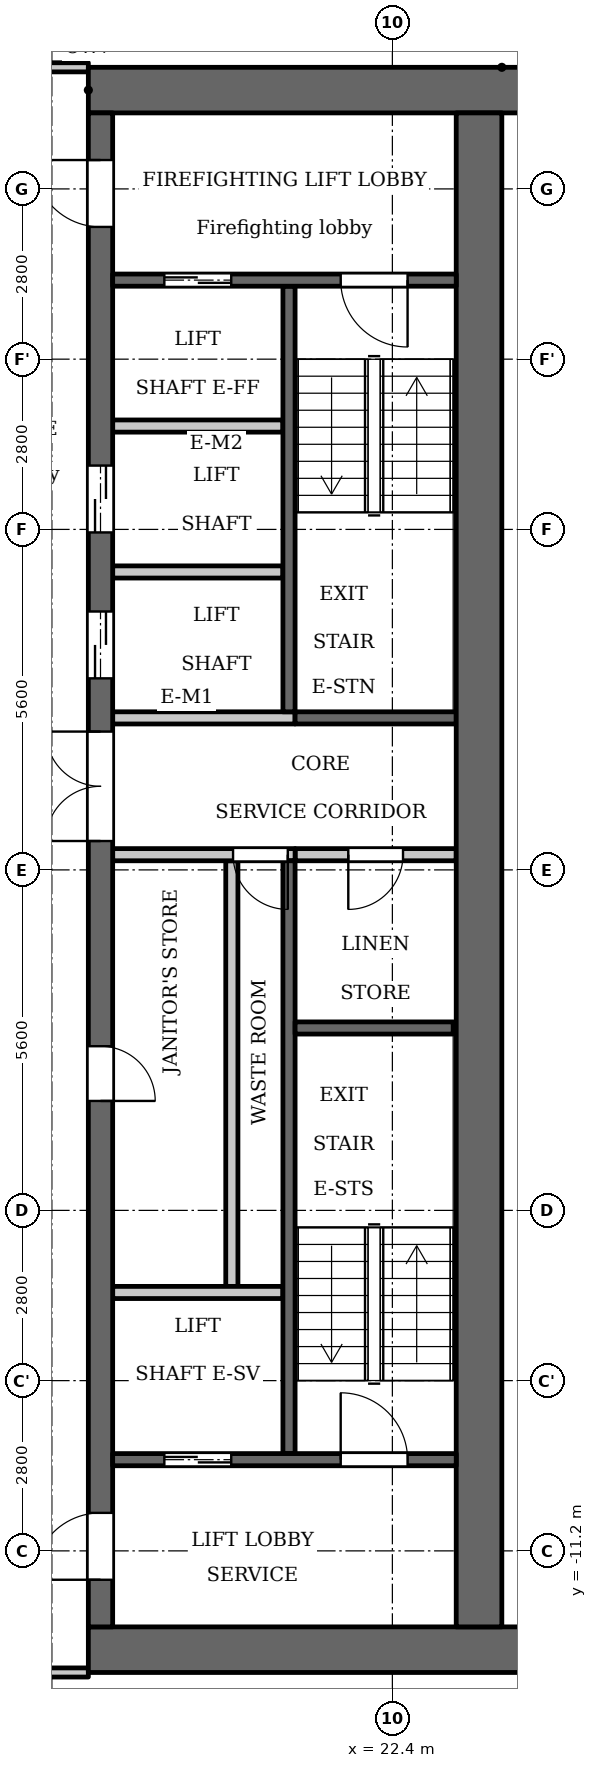
"""IFC4 building model, lengths in metres.
Left out: names, types, materials, properties, quantities, classifications, styles, units other than length and angle.
Written with IfcOpenShell. Run it as: python <this file> out.ifc"""

import sys

from ifc_helpers import new_model, si_unit, direction, frame, frame_2d, origin, place, context, subcontext, project, spatial, rectangle, extrude, element, fill, save


model = new_model("IFC4")
c1 = context("Model", 3, precision=1e-05, world=origin(), true_north=direction((0.0, 1.0)))
c2 = subcontext(c1, "Body", "Model", "MODEL_VIEW")
j1 = project(units=[si_unit("LENGTHUNIT", "METRE"), si_unit("PLANEANGLEUNIT", "RADIAN")], contexts=[c1])
p1 = place(None, origin())
s1 = spatial("IfcSite", under=j1, at=p1, CompositionType="ELEMENT")
p2 = place(p1, origin())
s2 = spatial("IfcBuilding", under=s1, at=p2, CompositionType="ELEMENT")
p3 = place(p2, frame((0.0, 0.0, 209.9)))
s3 = spatial("IfcBuildingStorey", under=s2, at=p3, CompositionType="ELEMENT", Elevation=209.9)
p4 = place(p3, frame((20.7, 2.6, 0.0), z_axis=(0.0, 0.0, 1.0), x_axis=(0.0, 1.0, 0.0)))
e1 = element("IfcWall", 1, at=p4, inside=s3, PredefinedType="SHEAR", context=c2, shape_type="SweptSolid", body=[
    extrude(rectangle(XDim=7.0, YDim=0.2, at=frame_2d((3.5, 0.0))), origin(), (0.0, 0.0, 1.0), 3.2),
])
p5 = place(p3, frame((20.7, -9.6, 0.0), z_axis=(0.0, 0.0, 1.0), x_axis=(0.0, 1.0, 0.0)))
e2 = element("IfcWall", 2, at=p5, inside=s3, PredefinedType="SHEAR", context=c2, shape_type="SweptSolid", body=[
    extrude(rectangle(XDim=9.75, YDim=0.2, at=frame_2d((4.875, 0.0))), origin(), (0.0, 0.0, 1.0), 3.2),
])
p6 = place(p3, frame((20.8, 2.5, 0.0), z_axis=(0.0, 0.0, 1.0), x_axis=(1.0, 0.0, 0.0)))
e3 = element("IfcWall", 3, at=p6, inside=s3, PredefinedType="SHEAR", context=c2, shape_type="SweptSolid", body=[
    extrude(rectangle(XDim=2.65, YDim=0.2, at=frame_2d((1.325, 0.0))), origin(), (0.0, 0.0, 1.0), 3.2),
])
p7 = place(p3, frame((20.8, 0.25, 0.0), z_axis=(0.0, 0.0, 1.0), x_axis=(1.0, 0.0, 0.0)))
e4 = element("IfcWall", 4, at=p7, inside=s3, PredefinedType="PARTITIONING", context=c2, shape_type="SweptSolid", body=[
    extrude(rectangle(XDim=2.65, YDim=0.2, at=frame_2d((1.325, 0.0))), origin(), (0.0, 0.0, 1.0), 3.2),
])
p8 = place(p7, frame((0.875, 0.0, 0.0)))
e5 = element("IfcOpeningElement", 5, at=p8, cuts=e4, PredefinedType="OPENING", context=c2, shape_type="SweptSolid", body=[
    extrude(rectangle(XDim=0.9, YDim=2.1, at=frame_2d((0.45, 1.05))), frame((0.0, 0.11, 0.0), z_axis=(0.0, -1.0, 0.0), x_axis=(1.0, 0.0, 0.0)), (0.0, 0.0, 1.0), 0.22),
])
for number, where, z_axis, x_axis in (
    (6, (17.4, 12.825, 0.0), (0.0, 0.0, 1.0), (1.0, 0.0, 0.0)),
    (7, (17.4, -12.825, 0.0), (0.0, 0.0, 1.0), (1.0, 0.0, 0.0)),
):
    element("IfcWall", number, at=place(p3, frame(where, z_axis=z_axis, x_axis=x_axis)), inside=s3, PredefinedType="SHEAR", context=c2, shape_type="SweptSolid", body=[
        extrude(rectangle(XDim=7.6, YDim=0.75, at=frame_2d((3.8, 0.0))), origin(), (0.0, 0.0, 1.0), 3.2),
    ])
p9 = place(p3, frame((19.76, -6.85, 0.0), z_axis=(0.0, 0.0, 1.0), x_axis=(0.0, 1.0, 0.0)))
e8 = element("IfcWall", 8, at=p9, inside=s3, PredefinedType="PARTITIONING", context=c2, shape_type="SweptSolid", body=[
    extrude(rectangle(XDim=7.0, YDim=0.2, at=frame_2d((3.5, 0.0))), origin(), (0.0, 0.0, 1.0), 3.2),
])
p10 = place(p3, frame((17.6, -12.45, 0.0), z_axis=(0.0, 0.0, 1.0), x_axis=(0.0, 1.0, 0.0)))
e9 = element("IfcWall", 9, at=p10, inside=s3, PredefinedType="SHEAR", context=c2, shape_type="SweptSolid", body=[
    extrude(rectangle(XDim=24.9, YDim=0.4, at=frame_2d((12.45, 0.0))), origin(), (0.0, 0.0, 1.0), 3.2),
])
p11 = place(p10, frame((8.65, 0.0, 0.0)))
e10 = element("IfcOpeningElement", 10, at=p11, cuts=e9, PredefinedType="OPENING", context=c2, shape_type="SweptSolid", body=[
    extrude(rectangle(XDim=0.9, YDim=2.1, at=frame_2d((0.45, 1.05))), frame((0.0, 0.21, 0.0), z_axis=(0.0, -1.0, 0.0), x_axis=(1.0, 0.0, 0.0)), (0.0, 0.0, 1.0), 0.42),
])
p12 = place(p10, frame((15.6, 0.0, 0.0)))
e11 = element("IfcOpeningElement", 11, at=p12, cuts=e9, PredefinedType="OPENING", context=c2, shape_type="SweptSolid", body=[
    extrude(rectangle(XDim=1.1, YDim=2.1, at=frame_2d((0.55, 1.05))), frame((0.0, 0.21, 0.0), z_axis=(0.0, -1.0, 0.0), x_axis=(1.0, 0.0, 0.0)), (0.0, 0.0, 1.0), 0.42),
])
p13 = place(p10, frame((18.0, 0.0, 0.0)))
e12 = element("IfcOpeningElement", 12, at=p13, cuts=e9, PredefinedType="OPENING", context=c2, shape_type="SweptSolid", body=[
    extrude(rectangle(XDim=1.1, YDim=2.1, at=frame_2d((0.55, 1.05))), frame((0.0, 0.21, 0.0), z_axis=(0.0, -1.0, 0.0), x_axis=(1.0, 0.0, 0.0)), (0.0, 0.0, 1.0), 0.42),
])
p14 = place(p10, frame((23.025, 0.0, 0.0)))
e13 = element("IfcOpeningElement", 13, at=p14, cuts=e9, PredefinedType="OPENING", context=c2, shape_type="SweptSolid", body=[
    extrude(rectangle(XDim=1.1, YDim=2.1, at=frame_2d((0.55, 1.05))), frame((0.0, 0.21, 0.0), z_axis=(0.0, -1.0, 0.0), x_axis=(1.0, 0.0, 0.0)), (0.0, 0.0, 1.0), 0.42),
])
p15 = place(p10, frame((0.775, 0.0, 0.0)))
e14 = element("IfcOpeningElement", 14, at=p15, cuts=e9, PredefinedType="OPENING", context=c2, shape_type="SweptSolid", body=[
    extrude(rectangle(XDim=1.1, YDim=2.1, at=frame_2d((0.55, 1.05))), frame((0.0, 0.21, 0.0), z_axis=(0.0, -1.0, 0.0), x_axis=(1.0, 0.0, 0.0)), (0.0, 0.0, 1.0), 0.42),
])
p16 = place(p10, frame((12.925, 0.0, 0.0)))
e15 = element("IfcOpeningElement", 15, at=p16, cuts=e9, PredefinedType="OPENING", context=c2, shape_type="SweptSolid", body=[
    extrude(rectangle(XDim=1.8, YDim=2.1, at=frame_2d((0.9, 1.05))), frame((0.0, 0.21, 0.0), z_axis=(0.0, -1.0, 0.0), x_axis=(1.0, 0.0, 0.0)), (0.0, 0.0, 1.0), 0.42),
])
p17 = place(p3, frame((23.825, -12.45, 0.0), z_axis=(0.0, 0.0, 1.0), x_axis=(0.0, 1.0, 0.0)))
e16 = element("IfcWall", 16, at=p17, inside=s3, PredefinedType="SHEAR", context=c2, shape_type="SweptSolid", body=[
    extrude(rectangle(XDim=24.9, YDim=0.75, at=frame_2d((12.45, 0.0))), origin(), (0.0, 0.0, 1.0), 3.2),
])
p18 = place(p3, frame((17.8, -9.7, 0.0), z_axis=(0.0, 0.0, 1.0), x_axis=(1.0, 0.0, 0.0)))
e17 = element("IfcWall", 17, at=p18, inside=s3, PredefinedType="SHEAR", context=c2, shape_type="SweptSolid", body=[
    extrude(rectangle(XDim=5.65, YDim=0.2, at=frame_2d((2.825, 0.0))), origin(), (0.0, 0.0, 1.0), 3.2),
])
p19 = place(p18, frame((0.85, 0.0, 0.0)))
e18 = element("IfcOpeningElement", 18, at=p19, cuts=e17, PredefinedType="OPENING", context=c2, shape_type="SweptSolid", body=[
    extrude(rectangle(XDim=1.1, YDim=2.1, at=frame_2d((0.55, 1.05))), frame((0.0, 0.11, 0.0), z_axis=(0.0, -1.0, 0.0), x_axis=(1.0, 0.0, 0.0)), (0.0, 0.0, 1.0), 0.22),
])
p20 = place(p18, frame((3.75, 0.0, 0.0)))
e19 = element("IfcOpeningElement", 19, at=p20, cuts=e17, PredefinedType="OPENING", context=c2, shape_type="SweptSolid", body=[
    extrude(rectangle(XDim=1.1, YDim=2.1, at=frame_2d((0.55, 1.05))), frame((0.0, 0.11, 0.0), z_axis=(0.0, -1.0, 0.0), x_axis=(1.0, 0.0, 0.0)), (0.0, 0.0, 1.0), 0.22),
])
p21 = place(p3, frame((17.8, -6.95, 0.0), z_axis=(0.0, 0.0, 1.0), x_axis=(1.0, 0.0, 0.0)))
e20 = element("IfcWall", 20, at=p21, inside=s3, PredefinedType="PARTITIONING", context=c2, shape_type="SweptSolid", body=[
    extrude(rectangle(XDim=2.8, YDim=0.2, at=frame_2d((1.4, 0.0))), origin(), (0.0, 0.0, 1.0), 3.2),
])
p22 = place(p3, frame((17.8, 0.25, 0.0), z_axis=(0.0, 0.0, 1.0), x_axis=(1.0, 0.0, 0.0)))
e21 = element("IfcWall", 21, at=p22, inside=s3, PredefinedType="PARTITIONING", context=c2, shape_type="SweptSolid", body=[
    extrude(rectangle(XDim=3.0, YDim=0.2, at=frame_2d((1.5, 0.0))), origin(), (0.0, 0.0, 1.0), 3.2),
])
p23 = place(p22, frame((1.98, 0.0, 0.0)))
e22 = element("IfcOpeningElement", 22, at=p23, cuts=e21, PredefinedType="OPENING", context=c2, shape_type="SweptSolid", body=[
    extrude(rectangle(XDim=0.9, YDim=2.1, at=frame_2d((0.45, 1.05))), frame((0.0, 0.11, 0.0), z_axis=(0.0, -1.0, 0.0), x_axis=(1.0, 0.0, 0.0)), (0.0, 0.0, 1.0), 0.22),
])
p24 = place(p3, frame((17.8, 2.5, 0.0), z_axis=(0.0, 0.0, 1.0), x_axis=(1.0, 0.0, 0.0)))
e23 = element("IfcWall", 23, at=p24, inside=s3, PredefinedType="PARTITIONING", context=c2, shape_type="SweptSolid", body=[
    extrude(rectangle(XDim=3.0, YDim=0.2, at=frame_2d((1.5, 0.0))), origin(), (0.0, 0.0, 1.0), 3.2),
])
for number, where, z_axis, x_axis in (
    (24, (17.8, 4.9, 0.0), (0.0, 0.0, 1.0), (1.0, 0.0, 0.0)),
    (25, (17.8, 7.3, 0.0), (0.0, 0.0, 1.0), (1.0, 0.0, 0.0)),
):
    element("IfcWall", number, at=place(p3, frame(where, z_axis=z_axis, x_axis=x_axis)), inside=s3, PredefinedType="PARTITIONING", context=c2, shape_type="SweptSolid", body=[
        extrude(rectangle(XDim=2.8, YDim=0.2, at=frame_2d((1.4, 0.0))), origin(), (0.0, 0.0, 1.0), 3.2),
    ])
p25 = place(p3, frame((17.8, 9.7, 0.0), z_axis=(0.0, 0.0, 1.0), x_axis=(1.0, 0.0, 0.0)))
e26 = element("IfcWall", 26, at=p25, inside=s3, PredefinedType="SHEAR", context=c2, shape_type="SweptSolid", body=[
    extrude(rectangle(XDim=5.65, YDim=0.2, at=frame_2d((2.825, 0.0))), origin(), (0.0, 0.0, 1.0), 3.2),
])
p26 = place(p25, frame((0.85, 0.0, 0.0)))
e27 = element("IfcOpeningElement", 27, at=p26, cuts=e26, PredefinedType="OPENING", context=c2, shape_type="SweptSolid", body=[
    extrude(rectangle(XDim=1.1, YDim=2.1, at=frame_2d((0.55, 1.05))), frame((0.0, 0.11, 0.0), z_axis=(0.0, -1.0, 0.0), x_axis=(1.0, 0.0, 0.0)), (0.0, 0.0, 1.0), 0.22),
])
p27 = place(p25, frame((3.75, 0.0, 0.0)))
e28 = element("IfcOpeningElement", 28, at=p27, cuts=e26, PredefinedType="OPENING", context=c2, shape_type="SweptSolid", body=[
    extrude(rectangle(XDim=1.1, YDim=2.1, at=frame_2d((0.55, 1.05))), frame((0.0, 0.11, 0.0), z_axis=(0.0, -1.0, 0.0), x_axis=(1.0, 0.0, 0.0)), (0.0, 0.0, 1.0), 0.22),
])
p28 = place(p3, frame((20.8, -2.6, 0.0), z_axis=(0.0, 0.0, 1.0), x_axis=(1.0, 0.0, 0.0)))
e29 = element("IfcWall", 29, at=p28, inside=s3, PredefinedType="SHEAR", context=c2, shape_type="SweptSolid", body=[
    extrude(rectangle(XDim=2.6, YDim=0.2, at=frame_2d((1.3, 0.0))), origin(), (0.0, 0.0, 1.0), 3.2),
])
p29 = place(p3, frame((-17.4, -13.2, 0.0), z_axis=(0.0, 0.0, 1.0), x_axis=(1.0, 0.0, 0.0)))
e30 = element("IfcWall", 30, at=p29, inside=s3, PredefinedType="PARTITIONING", context=c2, shape_type="SweptSolid", body=[
    extrude(rectangle(XDim=34.8, YDim=0.15, at=frame_2d((17.4, 0.0))), origin(), (0.0, 0.0, 1.0), 3.2),
])
p30 = place(p29, frame((0.65, 0.0, 0.0)))
e31 = element("IfcOpeningElement", 31, at=p30, cuts=e30, PredefinedType="OPENING", context=c2, shape_type="SweptSolid", body=[
    extrude(rectangle(XDim=1.0, YDim=2.1, at=frame_2d((0.5, 1.05))), frame((0.0, 0.085, 0.0), z_axis=(0.0, -1.0, 0.0), x_axis=(1.0, 0.0, 0.0)), (0.0, 0.0, 1.0), 0.17),
])
p31 = place(p29, frame((33.05, 0.0, 0.0)))
e32 = element("IfcOpeningElement", 32, at=p31, cuts=e30, PredefinedType="OPENING", context=c2, shape_type="SweptSolid", body=[
    extrude(rectangle(XDim=1.0, YDim=2.1, at=frame_2d((0.5, 1.05))), frame((0.0, 0.085, 0.0), z_axis=(0.0, -1.0, 0.0), x_axis=(1.0, 0.0, 0.0)), (0.0, 0.0, 1.0), 0.17),
])
p32 = place(p29, frame((4.55, 0.0, 0.0)))
e33 = element("IfcOpeningElement", 33, at=p32, cuts=e30, PredefinedType="OPENING", context=c2, shape_type="SweptSolid", body=[
    extrude(rectangle(XDim=1.0, YDim=2.1, at=frame_2d((0.5, 1.05))), frame((0.0, 0.085, 0.0), z_axis=(0.0, -1.0, 0.0), x_axis=(1.0, 0.0, 0.0)), (0.0, 0.0, 1.0), 0.17),
])
p33 = place(p29, frame((6.9, 0.0, 0.0)))
e34 = element("IfcOpeningElement", 34, at=p33, cuts=e30, PredefinedType="OPENING", context=c2, shape_type="SweptSolid", body=[
    extrude(rectangle(XDim=1.0, YDim=2.1, at=frame_2d((0.5, 1.05))), frame((0.0, 0.085, 0.0), z_axis=(0.0, -1.0, 0.0), x_axis=(1.0, 0.0, 0.0)), (0.0, 0.0, 1.0), 0.17),
])
p34 = place(p29, frame((15.75, 0.0, 0.0)))
e35 = element("IfcOpeningElement", 35, at=p34, cuts=e30, PredefinedType="OPENING", context=c2, shape_type="SweptSolid", body=[
    extrude(rectangle(XDim=1.0, YDim=2.1, at=frame_2d((0.5, 1.05))), frame((0.0, 0.085, 0.0), z_axis=(0.0, -1.0, 0.0), x_axis=(1.0, 0.0, 0.0)), (0.0, 0.0, 1.0), 0.17),
])
p35 = place(p29, frame((18.1, 0.0, 0.0)))
e36 = element("IfcOpeningElement", 36, at=p35, cuts=e30, PredefinedType="OPENING", context=c2, shape_type="SweptSolid", body=[
    extrude(rectangle(XDim=1.0, YDim=2.1, at=frame_2d((0.5, 1.05))), frame((0.0, 0.085, 0.0), z_axis=(0.0, -1.0, 0.0), x_axis=(1.0, 0.0, 0.0)), (0.0, 0.0, 1.0), 0.17),
])
p36 = place(p29, frame((26.95, 0.0, 0.0)))
e37 = element("IfcOpeningElement", 37, at=p36, cuts=e30, PredefinedType="OPENING", context=c2, shape_type="SweptSolid", body=[
    extrude(rectangle(XDim=1.0, YDim=2.1, at=frame_2d((0.5, 1.05))), frame((0.0, 0.085, 0.0), z_axis=(0.0, -1.0, 0.0), x_axis=(1.0, 0.0, 0.0)), (0.0, 0.0, 1.0), 0.17),
])
p37 = place(p29, frame((29.25, 0.0, 0.0)))
e38 = element("IfcOpeningElement", 38, at=p37, cuts=e30, PredefinedType="OPENING", context=c2, shape_type="SweptSolid", body=[
    extrude(rectangle(XDim=1.0, YDim=2.1, at=frame_2d((0.5, 1.05))), frame((0.0, 0.085, 0.0), z_axis=(0.0, -1.0, 0.0), x_axis=(1.0, 0.0, 0.0)), (0.0, 0.0, 1.0), 0.17),
])
p38 = place(p3, frame((-17.4, 13.2, 0.0), z_axis=(0.0, 0.0, 1.0), x_axis=(1.0, 0.0, 0.0)))
e39 = element("IfcWall", 39, at=p38, inside=s3, PredefinedType="PARTITIONING", context=c2, shape_type="SweptSolid", body=[
    extrude(rectangle(XDim=34.8, YDim=0.15, at=frame_2d((17.4, 0.0))), origin(), (0.0, 0.0, 1.0), 3.2),
])
p39 = place(p38, frame((0.75, 0.0, 0.0)))
e40 = element("IfcOpeningElement", 40, at=p39, cuts=e39, PredefinedType="OPENING", context=c2, shape_type="SweptSolid", body=[
    extrude(rectangle(XDim=1.0, YDim=2.1, at=frame_2d((0.5, 1.05))), frame((0.0, 0.085, 0.0), z_axis=(0.0, -1.0, 0.0), x_axis=(1.0, 0.0, 0.0)), (0.0, 0.0, 1.0), 0.17),
])
p40 = place(p38, frame((33.15, 0.0, 0.0)))
e41 = element("IfcOpeningElement", 41, at=p40, cuts=e39, PredefinedType="OPENING", context=c2, shape_type="SweptSolid", body=[
    extrude(rectangle(XDim=1.0, YDim=2.1, at=frame_2d((0.5, 1.05))), frame((0.0, 0.085, 0.0), z_axis=(0.0, -1.0, 0.0), x_axis=(1.0, 0.0, 0.0)), (0.0, 0.0, 1.0), 0.17),
])
p41 = place(p38, frame((12.45, 0.0, 0.0)))
e42 = element("IfcOpeningElement", 42, at=p41, cuts=e39, PredefinedType="OPENING", context=c2, shape_type="SweptSolid", body=[
    extrude(rectangle(XDim=1.0, YDim=2.1, at=frame_2d((0.5, 1.05))), frame((0.0, 0.085, 0.0), z_axis=(0.0, -1.0, 0.0), x_axis=(1.0, 0.0, 0.0)), (0.0, 0.0, 1.0), 0.17),
])
p42 = place(p38, frame((18.05, 0.0, 0.0)))
e43 = element("IfcOpeningElement", 43, at=p42, cuts=e39, PredefinedType="OPENING", context=c2, shape_type="SweptSolid", body=[
    extrude(rectangle(XDim=1.0, YDim=2.1, at=frame_2d((0.5, 1.05))), frame((0.0, 0.085, 0.0), z_axis=(0.0, -1.0, 0.0), x_axis=(1.0, 0.0, 0.0)), (0.0, 0.0, 1.0), 0.17),
])
p43 = place(p19, origin())
e44 = element("IfcDoor", 44, at=p43, inside=s3, OperationType="DOUBLE_DOOR_SLIDING", PredefinedType="DOOR", context=c2, shape_type="SweptSolid", body=[
    extrude(rectangle(XDim=1.1, YDim=2.1, at=frame_2d((0.55, 1.05))), frame((0.0, 0.025, 0.0), z_axis=(0.0, -1.0, 0.0), x_axis=(1.0, 0.0, 0.0)), (0.0, 0.0, 1.0), 0.05),
])
fill(e18, e44)
p44 = place(p11, origin())
e45 = element("IfcDoor", 45, at=p44, inside=s3, OperationType="SINGLE_SWING_LEFT", PredefinedType="DOOR", context=c2, shape_type="SweptSolid", body=[
    extrude(rectangle(XDim=0.9, YDim=2.1, at=frame_2d((0.45, 1.05))), frame((0.0, 0.025, 0.0), z_axis=(0.0, -1.0, 0.0), x_axis=(1.0, 0.0, 0.0)), (0.0, 0.0, 1.0), 0.05),
])
fill(e10, e45)
p45 = place(p23, origin())
e46 = element("IfcDoor", 46, at=p45, inside=s3, OperationType="SINGLE_SWING_RIGHT", PredefinedType="DOOR", context=c2, shape_type="SweptSolid", body=[
    extrude(rectangle(XDim=0.9, YDim=2.1, at=frame_2d((0.45, 1.05))), frame((0.0, 0.025, 0.0), z_axis=(0.0, -1.0, 0.0), x_axis=(1.0, 0.0, 0.0)), (0.0, 0.0, 1.0), 0.05),
])
fill(e22, e46)
p46 = place(p12, origin())
e47 = element("IfcDoor", 47, at=p46, inside=s3, OperationType="DOUBLE_DOOR_SLIDING", PredefinedType="DOOR", context=c2, shape_type="SweptSolid", body=[
    extrude(rectangle(XDim=1.1, YDim=2.1, at=frame_2d((0.55, 1.05))), frame((0.0, 0.025, 0.0), z_axis=(0.0, -1.0, 0.0), x_axis=(1.0, 0.0, 0.0)), (0.0, 0.0, 1.0), 0.05),
])
fill(e11, e47)
p47 = place(p13, origin())
e48 = element("IfcDoor", 48, at=p47, inside=s3, OperationType="DOUBLE_DOOR_SLIDING", PredefinedType="DOOR", context=c2, shape_type="SweptSolid", body=[
    extrude(rectangle(XDim=1.1, YDim=2.1, at=frame_2d((0.55, 1.05))), frame((0.0, 0.025, 0.0), z_axis=(0.0, -1.0, 0.0), x_axis=(1.0, 0.0, 0.0)), (0.0, 0.0, 1.0), 0.05),
])
fill(e12, e48)
p48 = place(p26, origin())
e49 = element("IfcDoor", 49, at=p48, inside=s3, OperationType="DOUBLE_DOOR_SLIDING", PredefinedType="DOOR", context=c2, shape_type="SweptSolid", body=[
    extrude(rectangle(XDim=1.1, YDim=2.1, at=frame_2d((0.55, 1.05))), frame((0.0, 0.025, 0.0), z_axis=(0.0, -1.0, 0.0), x_axis=(1.0, 0.0, 0.0)), (0.0, 0.0, 1.0), 0.05),
])
fill(e27, e49)
p49 = place(p14, origin())
e50 = element("IfcDoor", 50, at=p49, inside=s3, OperationType="SINGLE_SWING_LEFT", PredefinedType="DOOR", context=c2, shape_type="SweptSolid", body=[
    extrude(rectangle(XDim=1.1, YDim=2.1, at=frame_2d((0.55, 1.05))), frame((0.0, 0.025, 0.0), z_axis=(0.0, -1.0, 0.0), x_axis=(1.0, 0.0, 0.0)), (0.0, 0.0, 1.0), 0.05),
])
fill(e13, e50)
p50 = place(p15, origin())
e51 = element("IfcDoor", 51, at=p50, inside=s3, OperationType="SINGLE_SWING_RIGHT", PredefinedType="DOOR", context=c2, shape_type="SweptSolid", body=[
    extrude(rectangle(XDim=1.1, YDim=2.1, at=frame_2d((0.55, 1.05))), frame((0.0, 0.025, 0.0), z_axis=(0.0, -1.0, 0.0), x_axis=(1.0, 0.0, 0.0)), (0.0, 0.0, 1.0), 0.05),
])
fill(e14, e51)
p51 = place(p27, origin())
e52 = element("IfcDoor", 52, at=p51, inside=s3, OperationType="SINGLE_SWING_RIGHT", PredefinedType="DOOR", context=c2, shape_type="SweptSolid", body=[
    extrude(rectangle(XDim=1.1, YDim=2.1, at=frame_2d((0.55, 1.05))), frame((0.0, 0.025, 0.0), z_axis=(0.0, -1.0, 0.0), x_axis=(1.0, 0.0, 0.0)), (0.0, 0.0, 1.0), 0.05),
])
fill(e28, e52)
p52 = place(p20, origin())
e53 = element("IfcDoor", 53, at=p52, inside=s3, OperationType="SINGLE_SWING_RIGHT", PredefinedType="DOOR", context=c2, shape_type="SweptSolid", body=[
    extrude(rectangle(XDim=1.1, YDim=2.1, at=frame_2d((0.55, 1.05))), frame((0.0, 0.025, 0.0), z_axis=(0.0, -1.0, 0.0), x_axis=(1.0, 0.0, 0.0)), (0.0, 0.0, 1.0), 0.05),
])
fill(e19, e53)
p53 = place(p16, origin())
e54 = element("IfcDoor", 54, at=p53, inside=s3, OperationType="DOUBLE_DOOR_SINGLE_SWING", PredefinedType="DOOR", context=c2, shape_type="SweptSolid", body=[
    extrude(rectangle(XDim=1.8, YDim=2.1, at=frame_2d((0.9, 1.05))), frame((0.0, 0.025, 0.0), z_axis=(0.0, -1.0, 0.0), x_axis=(1.0, 0.0, 0.0)), (0.0, 0.0, 1.0), 0.05),
])
fill(e15, e54)
p54 = place(p8, origin())
e55 = element("IfcDoor", 55, at=p54, inside=s3, OperationType="SINGLE_SWING_LEFT", PredefinedType="DOOR", context=c2, shape_type="SweptSolid", body=[
    extrude(rectangle(XDim=0.9, YDim=2.1, at=frame_2d((0.45, 1.05))), frame((0.0, 0.025, 0.0), z_axis=(0.0, -1.0, 0.0), x_axis=(1.0, 0.0, 0.0)), (0.0, 0.0, 1.0), 0.05),
])
fill(e5, e55)
save(model, sys.argv[1])
